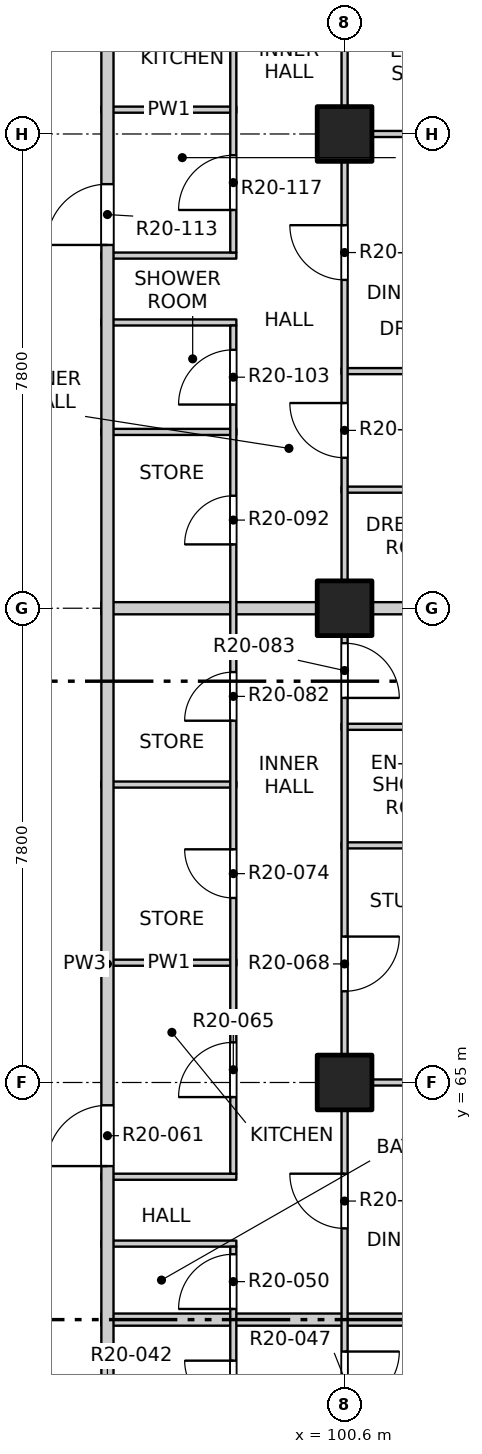
"""IFC4 building model, lengths in metres.
Left out: names, types, materials, properties, quantities, classifications, styles, units other than length and angle.
Written with IfcOpenShell. Run it as: python <this file> out.ifc"""

import sys

from ifc_helpers import new_model, si_unit, direction, frame, frame_2d, origin, origin_2d, place, context, subcontext, project, spatial, rectangle, extrude, element, fill, save


model = new_model("IFC4")
c1 = context("Model", 3, precision=1e-05, world=origin(), true_north=direction((0.0, 1.0)))
c2 = subcontext(c1, "Body", "Model", "MODEL_VIEW")
j1 = project(units=[si_unit("LENGTHUNIT", "METRE"), si_unit("PLANEANGLEUNIT", "RADIAN")], contexts=[c1])
p1 = place(None, origin())
s1 = spatial("IfcSite", under=j1, at=p1, CompositionType="ELEMENT")
p2 = place(p1, origin())
s2 = spatial("IfcBuilding", under=s1, at=p2, CompositionType="ELEMENT")
p3 = place(p2, frame((0.0, 0.0, 204.1)))
s3 = spatial("IfcBuildingStorey", under=s2, at=p3, CompositionType="ELEMENT", Elevation=204.1)
for number, where, z_axis, x_axis in (
    (1, (100.6, 65.0, -0.25), (0.0, 0.0, 1.0), (1.0, 0.0, 0.0)),
    (2, (100.6, 72.8, -0.25), (0.0, 0.0, 1.0), (1.0, 0.0, 0.0)),
    (3, (100.6, 80.6, -0.25), (0.0, 0.0, 1.0), (1.0, 0.0, 0.0)),
):
    element("IfcColumn", number, at=place(p3, frame(where, z_axis=z_axis, x_axis=x_axis)), inside=s3, PredefinedType="COLUMN", context=c2, shape_type="SweptSolid", body=[
        extrude(rectangle(XDim=0.9, YDim=0.9, at=origin_2d()), origin(), (0.0, 0.0, 1.0), 3.4),
    ])
p4 = place(p3, frame((96.6, 61.1, 0.0), z_axis=(0.0, 0.0, 1.0), x_axis=(1.0, 0.0, 0.0)))
e4 = element("IfcWall", 4, at=p4, inside=s3, PredefinedType="PARTITIONING", context=c2, shape_type="SweptSolid", body=[
    extrude(rectangle(XDim=11.5, YDim=0.2, at=frame_2d((5.75, 0.0))), origin(), (0.0, 0.0, 1.0), 2.55),
])
for number, where, z_axis, x_axis in (
    (5, (96.6, 62.35, 0.0), (0.0, 0.0, 1.0), (1.0, 0.0, 0.0)),
    (6, (96.6, 63.45, 0.0), (0.0, 0.0, 1.0), (1.0, 0.0, 0.0)),
):
    element("IfcWall", number, at=place(p3, frame(where, z_axis=z_axis, x_axis=x_axis)), inside=s3, PredefinedType="PARTITIONING", context=c2, shape_type="SweptSolid", body=[
        extrude(rectangle(XDim=2.22, YDim=0.1, at=frame_2d((1.11, 0.0))), origin(), (0.0, 0.0, 1.0), 3.15),
    ])
p5 = place(p3, frame((100.55, 65.0, 0.0), z_axis=(0.0, 0.0, 1.0), x_axis=(1.0, 0.0, 0.0)))
e7 = element("IfcWall", 7, at=p5, inside=s3, PredefinedType="PARTITIONING", context=c2, shape_type="SweptSolid", body=[
    extrude(rectangle(XDim=7.55, YDim=0.1, at=frame_2d((3.775, 0.0))), origin(), (0.0, 0.0, 1.0), 3.15),
])
p6 = place(p3, frame((96.6, 66.97, 0.0), z_axis=(0.0, 0.0, 1.0), x_axis=(1.0, 0.0, 0.0)))
e8 = element("IfcWall", 8, at=p6, inside=s3, PredefinedType="PARTITIONING", context=c2, shape_type="SweptSolid", body=[
    extrude(rectangle(XDim=2.22, YDim=0.1, at=frame_2d((1.11, 0.0))), origin(), (0.0, 0.0, 1.0), 3.15),
])
p7 = place(p3, frame((100.55, 68.9, 0.0), z_axis=(0.0, 0.0, 1.0), x_axis=(1.0, 0.0, 0.0)))
e9 = element("IfcWall", 9, at=p7, inside=s3, PredefinedType="PARTITIONING", context=c2, shape_type="SweptSolid", body=[
    extrude(rectangle(XDim=7.55, YDim=0.1, at=frame_2d((3.775, 0.0))), origin(), (0.0, 0.0, 1.0), 2.55),
])
p8 = place(p3, frame((96.6, 69.9, 0.0), z_axis=(0.0, 0.0, 1.0), x_axis=(1.0, 0.0, 0.0)))
e10 = element("IfcWall", 10, at=p8, inside=s3, PredefinedType="PARTITIONING", context=c2, shape_type="SweptSolid", body=[
    extrude(rectangle(XDim=2.22, YDim=0.1, at=frame_2d((1.11, 0.0))), origin(), (0.0, 0.0, 1.0), 3.15),
])
p9 = place(p3, frame((100.55, 70.85, 0.0), z_axis=(0.0, 0.0, 1.0), x_axis=(1.0, 0.0, 0.0)))
e11 = element("IfcWall", 11, at=p9, inside=s3, PredefinedType="PARTITIONING", context=c2, shape_type="SweptSolid", body=[
    extrude(rectangle(XDim=3.7, YDim=0.1, at=frame_2d((1.85, 0.0))), origin(), (0.0, 0.0, 1.0), 3.15),
])
p10 = place(p3, frame((96.6, 72.8, 0.0), z_axis=(0.0, 0.0, 1.0), x_axis=(1.0, 0.0, 0.0)))
e12 = element("IfcWall", 12, at=p10, inside=s3, PredefinedType="PARTITIONING", context=c2, shape_type="SweptSolid", body=[
    extrude(rectangle(XDim=11.5, YDim=0.2, at=frame_2d((5.75, 0.0))), origin(), (0.0, 0.0, 1.0), 3.15),
])
p11 = place(p3, frame((100.55, 74.75, 0.0), z_axis=(0.0, 0.0, 1.0), x_axis=(1.0, 0.0, 0.0)))
e13 = element("IfcWall", 13, at=p11, inside=s3, PredefinedType="PARTITIONING", context=c2, shape_type="SweptSolid", body=[
    extrude(rectangle(XDim=3.7, YDim=0.1, at=frame_2d((1.85, 0.0))), origin(), (0.0, 0.0, 1.0), 3.15),
])
p12 = place(p3, frame((96.6, 75.7, 0.0), z_axis=(0.0, 0.0, 1.0), x_axis=(1.0, 0.0, 0.0)))
e14 = element("IfcWall", 14, at=p12, inside=s3, PredefinedType="PARTITIONING", context=c2, shape_type="SweptSolid", body=[
    extrude(rectangle(XDim=2.22, YDim=0.1, at=frame_2d((1.11, 0.0))), origin(), (0.0, 0.0, 1.0), 3.15),
])
p13 = place(p3, frame((100.55, 76.7, 0.0), z_axis=(0.0, 0.0, 1.0), x_axis=(1.0, 0.0, 0.0)))
e15 = element("IfcWall", 15, at=p13, inside=s3, PredefinedType="PARTITIONING", context=c2, shape_type="SweptSolid", body=[
    extrude(rectangle(XDim=7.55, YDim=0.1, at=frame_2d((3.775, 0.0))), origin(), (0.0, 0.0, 1.0), 2.55),
])
for number, where, z_axis, x_axis in (
    (16, (96.6, 77.5, 0.0), (0.0, 0.0, 1.0), (1.0, 0.0, 0.0)),
    (17, (96.6, 78.6, 0.0), (0.0, 0.0, 1.0), (1.0, 0.0, 0.0)),
):
    element("IfcWall", number, at=place(p3, frame(where, z_axis=z_axis, x_axis=x_axis)), inside=s3, PredefinedType="PARTITIONING", context=c2, shape_type="SweptSolid", body=[
        extrude(rectangle(XDim=2.22, YDim=0.1, at=frame_2d((1.11, 0.0))), origin(), (0.0, 0.0, 1.0), 3.15),
    ])
p14 = place(p3, frame((100.55, 80.6, 0.0), z_axis=(0.0, 0.0, 1.0), x_axis=(1.0, 0.0, 0.0)))
e18 = element("IfcWall", 18, at=p14, inside=s3, PredefinedType="PARTITIONING", context=c2, shape_type="SweptSolid", body=[
    extrude(rectangle(XDim=7.55, YDim=0.1, at=frame_2d((3.775, 0.0))), origin(), (0.0, 0.0, 1.0), 3.15),
])
p15 = place(p3, frame((96.6, 81.0, 0.0), z_axis=(0.0, 0.0, 1.0), x_axis=(1.0, 0.0, 0.0)))
e19 = element("IfcWall", 19, at=p15, inside=s3, PredefinedType="PARTITIONING", context=c2, shape_type="SweptSolid", body=[
    extrude(rectangle(XDim=2.22, YDim=0.1, at=frame_2d((1.11, 0.0))), origin(), (0.0, 0.0, 1.0), 3.15),
])
p16 = place(p3, frame((96.7, 49.5, 0.0), z_axis=(0.0, 0.0, 1.0), x_axis=(0.0, 1.0, 0.0)))
e20 = element("IfcWall", 20, at=p16, inside=s3, PredefinedType="PARTITIONING", context=c2, shape_type="SweptSolid", body=[
    extrude(rectangle(XDim=34.9, YDim=0.2, at=frame_2d((17.45, 0.0))), origin(), (0.0, 0.0, 1.0), 3.15),
])
p17 = place(p16, frame((9.625, 0.0, 0.0)))
e21 = element("IfcOpeningElement", 21, at=p17, cuts=e20, PredefinedType="OPENING", context=c2, shape_type="SweptSolid", body=[
    extrude(rectangle(XDim=1.0, YDim=2.1, at=frame_2d((0.5, 1.05))), frame((0.0, 0.11, 0.0), z_axis=(0.0, -1.0, 0.0), x_axis=(1.0, 0.0, 0.0)), (0.0, 0.0, 1.0), 0.22),
])
p18 = place(p16, frame((14.125, 0.0, 0.0)))
e22 = element("IfcOpeningElement", 22, at=p18, cuts=e20, PredefinedType="OPENING", context=c2, shape_type="SweptSolid", body=[
    extrude(rectangle(XDim=1.0, YDim=2.1, at=frame_2d((0.5, 1.05))), frame((0.0, 0.11, 0.0), z_axis=(0.0, -1.0, 0.0), x_axis=(1.0, 0.0, 0.0)), (0.0, 0.0, 1.0), 0.22),
])
p19 = place(p16, frame((29.275, 0.0, 0.0)))
e23 = element("IfcOpeningElement", 23, at=p19, cuts=e20, PredefinedType="OPENING", context=c2, shape_type="SweptSolid", body=[
    extrude(rectangle(XDim=1.0, YDim=2.1, at=frame_2d((0.5, 1.05))), frame((0.0, 0.11, 0.0), z_axis=(0.0, -1.0, 0.0), x_axis=(1.0, 0.0, 0.0)), (0.0, 0.0, 1.0), 0.22),
])
p20 = place(p3, frame((98.77, 59.0, 0.0), z_axis=(0.0, 0.0, 1.0), x_axis=(0.0, 1.0, 0.0)))
e24 = element("IfcWall", 24, at=p20, inside=s3, PredefinedType="PARTITIONING", context=c2, shape_type="SweptSolid", body=[
    extrude(rectangle(XDim=3.3, YDim=0.1, at=frame_2d((1.65, 0.0))), origin(), (0.0, 0.0, 1.0), 3.15),
])
p21 = place(p20, frame((0.625, 0.0, 0.0)))
e25 = element("IfcOpeningElement", 25, at=p21, cuts=e24, PredefinedType="OPENING", context=c2, shape_type="SweptSolid", body=[
    extrude(rectangle(XDim=0.8, YDim=2.1, at=frame_2d((0.4, 1.05))), frame((0.0, 0.06, 0.0), z_axis=(0.0, -1.0, 0.0), x_axis=(1.0, 0.0, 0.0)), (0.0, 0.0, 1.0), 0.12),
])
p22 = place(p20, frame((2.275, 0.0, 0.0)))
e26 = element("IfcOpeningElement", 26, at=p22, cuts=e24, PredefinedType="OPENING", context=c2, shape_type="SweptSolid", body=[
    extrude(rectangle(XDim=0.9, YDim=2.1, at=frame_2d((0.45, 1.05))), frame((0.0, 0.06, 0.0), z_axis=(0.0, -1.0, 0.0), x_axis=(1.0, 0.0, 0.0)), (0.0, 0.0, 1.0), 0.12),
])
p23 = place(p3, frame((98.77, 63.5, 0.0), z_axis=(0.0, 0.0, 1.0), x_axis=(0.0, 1.0, 0.0)))
e27 = element("IfcWall", 27, at=p23, inside=s3, PredefinedType="PARTITIONING", context=c2, shape_type="SweptSolid", body=[
    extrude(rectangle(XDim=13.95, YDim=0.1, at=frame_2d((6.975, 0.0))), origin(), (0.0, 0.0, 1.0), 3.15),
])
p24 = place(p23, frame((1.26, 0.0, 0.0)))
e28 = element("IfcOpeningElement", 28, at=p24, cuts=e27, PredefinedType="OPENING", context=c2, shape_type="SweptSolid", body=[
    extrude(rectangle(XDim=0.9, YDim=2.1, at=frame_2d((0.45, 1.05))), frame((0.0, 0.06, 0.0), z_axis=(0.0, -1.0, 0.0), x_axis=(1.0, 0.0, 0.0)), (0.0, 0.0, 1.0), 0.12),
])
p25 = place(p23, frame((4.535, 0.0, 0.0)))
e29 = element("IfcOpeningElement", 29, at=p25, cuts=e27, PredefinedType="OPENING", context=c2, shape_type="SweptSolid", body=[
    extrude(rectangle(XDim=0.8, YDim=2.1, at=frame_2d((0.4, 1.05))), frame((0.0, 0.06, 0.0), z_axis=(0.0, -1.0, 0.0), x_axis=(1.0, 0.0, 0.0)), (0.0, 0.0, 1.0), 0.12),
])
p26 = place(p23, frame((7.45, 0.0, 0.0)))
e30 = element("IfcOpeningElement", 30, at=p26, cuts=e27, PredefinedType="OPENING", context=c2, shape_type="SweptSolid", body=[
    extrude(rectangle(XDim=0.8, YDim=2.1, at=frame_2d((0.4, 1.05))), frame((0.0, 0.06, 0.0), z_axis=(0.0, -1.0, 0.0), x_axis=(1.0, 0.0, 0.0)), (0.0, 0.0, 1.0), 0.12),
])
p27 = place(p23, frame((10.35, 0.0, 0.0)))
e31 = element("IfcOpeningElement", 31, at=p27, cuts=e27, PredefinedType="OPENING", context=c2, shape_type="SweptSolid", body=[
    extrude(rectangle(XDim=0.8, YDim=2.1, at=frame_2d((0.4, 1.05))), frame((0.0, 0.06, 0.0), z_axis=(0.0, -1.0, 0.0), x_axis=(1.0, 0.0, 0.0)), (0.0, 0.0, 1.0), 0.12),
])
p28 = place(p23, frame((12.65, 0.0, 0.0)))
e32 = element("IfcOpeningElement", 32, at=p28, cuts=e27, PredefinedType="OPENING", context=c2, shape_type="SweptSolid", body=[
    extrude(rectangle(XDim=0.9, YDim=2.1, at=frame_2d((0.45, 1.05))), frame((0.0, 0.06, 0.0), z_axis=(0.0, -1.0, 0.0), x_axis=(1.0, 0.0, 0.0)), (0.0, 0.0, 1.0), 0.12),
])
p29 = place(p3, frame((98.77, 78.65, 0.0), z_axis=(0.0, 0.0, 1.0), x_axis=(0.0, 1.0, 0.0)))
e33 = element("IfcWall", 33, at=p29, inside=s3, PredefinedType="PARTITIONING", context=c2, shape_type="SweptSolid", body=[
    extrude(rectangle(XDim=5.8, YDim=0.1, at=frame_2d((2.9, 0.0))), origin(), (0.0, 0.0, 1.0), 3.15),
])
p30 = place(p29, frame((0.7, 0.0, 0.0)))
e34 = element("IfcOpeningElement", 34, at=p30, cuts=e33, PredefinedType="OPENING", context=c2, shape_type="SweptSolid", body=[
    extrude(rectangle(XDim=0.9, YDim=2.1, at=frame_2d((0.45, 1.05))), frame((0.0, 0.06, 0.0), z_axis=(0.0, -1.0, 0.0), x_axis=(1.0, 0.0, 0.0)), (0.0, 0.0, 1.0), 0.12),
])
p31 = place(p29, frame((3.65, 0.0, 0.0)))
e35 = element("IfcOpeningElement", 35, at=p31, cuts=e33, PredefinedType="OPENING", context=c2, shape_type="SweptSolid", body=[
    extrude(rectangle(XDim=0.9, YDim=2.1, at=frame_2d((0.45, 1.05))), frame((0.0, 0.06, 0.0), z_axis=(0.0, -1.0, 0.0), x_axis=(1.0, 0.0, 0.0)), (0.0, 0.0, 1.0), 0.12),
])
p32 = place(p3, frame((100.6, 41.9, 0.0), z_axis=(0.0, 0.0, 1.0), x_axis=(0.0, 1.0, 0.0)))
e36 = element("IfcWall", 36, at=p32, inside=s3, PredefinedType="PARTITIONING", context=c2, shape_type="SweptSolid", body=[
    extrude(rectangle(XDim=46.2, YDim=0.1, at=frame_2d((23.1, 0.0))), origin(), (0.0, 0.0, 1.0), 3.15),
])
p33 = place(p32, frame((1.2, 0.0, 0.0)))
e37 = element("IfcOpeningElement", 37, at=p33, cuts=e36, PredefinedType="OPENING", context=c2, shape_type="SweptSolid", body=[
    extrude(rectangle(XDim=0.9, YDim=2.1, at=frame_2d((0.45, 1.05))), frame((0.0, 0.06, 0.0), z_axis=(0.0, -1.0, 0.0), x_axis=(1.0, 0.0, 0.0)), (0.0, 0.0, 1.0), 0.12),
])
p34 = place(p32, frame((6.025, 0.0, 0.0)))
e38 = element("IfcOpeningElement", 38, at=p34, cuts=e36, PredefinedType="OPENING", context=c2, shape_type="SweptSolid", body=[
    extrude(rectangle(XDim=0.9, YDim=2.1, at=frame_2d((0.45, 1.05))), frame((0.0, 0.06, 0.0), z_axis=(0.0, -1.0, 0.0), x_axis=(1.0, 0.0, 0.0)), (0.0, 0.0, 1.0), 0.12),
])
p35 = place(p32, frame((9.0, 0.0, 0.0)))
e39 = element("IfcOpeningElement", 39, at=p35, cuts=e36, PredefinedType="OPENING", context=c2, shape_type="SweptSolid", body=[
    extrude(rectangle(XDim=0.9, YDim=2.1, at=frame_2d((0.45, 1.05))), frame((0.0, 0.06, 0.0), z_axis=(0.0, -1.0, 0.0), x_axis=(1.0, 0.0, 0.0)), (0.0, 0.0, 1.0), 0.12),
])
p36 = place(p32, frame((13.85, 0.0, 0.0)))
e40 = element("IfcOpeningElement", 40, at=p36, cuts=e36, PredefinedType="OPENING", context=c2, shape_type="SweptSolid", body=[
    extrude(rectangle(XDim=0.9, YDim=2.1, at=frame_2d((0.45, 1.05))), frame((0.0, 0.06, 0.0), z_axis=(0.0, -1.0, 0.0), x_axis=(1.0, 0.0, 0.0)), (0.0, 0.0, 1.0), 0.12),
])
p37 = place(p32, frame((17.775, 0.0, 0.0)))
e41 = element("IfcOpeningElement", 41, at=p37, cuts=e36, PredefinedType="OPENING", context=c2, shape_type="SweptSolid", body=[
    extrude(rectangle(XDim=0.9, YDim=2.1, at=frame_2d((0.45, 1.05))), frame((0.0, 0.06, 0.0), z_axis=(0.0, -1.0, 0.0), x_axis=(1.0, 0.0, 0.0)), (0.0, 0.0, 1.0), 0.12),
])
p38 = place(p32, frame((20.7, 0.0, 0.0)))
e42 = element("IfcOpeningElement", 42, at=p38, cuts=e36, PredefinedType="OPENING", context=c2, shape_type="SweptSolid", body=[
    extrude(rectangle(XDim=0.9, YDim=2.1, at=frame_2d((0.45, 1.05))), frame((0.0, 0.06, 0.0), z_axis=(0.0, -1.0, 0.0), x_axis=(1.0, 0.0, 0.0)), (0.0, 0.0, 1.0), 0.12),
])
p39 = place(p32, frame((24.6, 0.0, 0.0)))
e43 = element("IfcOpeningElement", 43, at=p39, cuts=e36, PredefinedType="OPENING", context=c2, shape_type="SweptSolid", body=[
    extrude(rectangle(XDim=0.9, YDim=2.1, at=frame_2d((0.45, 1.05))), frame((0.0, 0.06, 0.0), z_axis=(0.0, -1.0, 0.0), x_axis=(1.0, 0.0, 0.0)), (0.0, 0.0, 1.0), 0.12),
])
p40 = place(p32, frame((29.425, 0.0, 0.0)))
e44 = element("IfcOpeningElement", 44, at=p40, cuts=e36, PredefinedType="OPENING", context=c2, shape_type="SweptSolid", body=[
    extrude(rectangle(XDim=0.9, YDim=2.1, at=frame_2d((0.45, 1.05))), frame((0.0, 0.06, 0.0), z_axis=(0.0, -1.0, 0.0), x_axis=(1.0, 0.0, 0.0)), (0.0, 0.0, 1.0), 0.12),
])
p41 = place(p32, frame((33.375, 0.0, 0.0)))
e45 = element("IfcOpeningElement", 45, at=p41, cuts=e36, PredefinedType="OPENING", context=c2, shape_type="SweptSolid", body=[
    extrude(rectangle(XDim=0.9, YDim=2.1, at=frame_2d((0.45, 1.05))), frame((0.0, 0.06, 0.0), z_axis=(0.0, -1.0, 0.0), x_axis=(1.0, 0.0, 0.0)), (0.0, 0.0, 1.0), 0.12),
])
p42 = place(p32, frame((36.3, 0.0, 0.0)))
e46 = element("IfcOpeningElement", 46, at=p42, cuts=e36, PredefinedType="OPENING", context=c2, shape_type="SweptSolid", body=[
    extrude(rectangle(XDim=0.9, YDim=2.1, at=frame_2d((0.45, 1.05))), frame((0.0, 0.06, 0.0), z_axis=(0.0, -1.0, 0.0), x_axis=(1.0, 0.0, 0.0)), (0.0, 0.0, 1.0), 0.12),
])
p43 = place(p32, frame((41.175, 0.0, 0.0)))
e47 = element("IfcOpeningElement", 47, at=p43, cuts=e36, PredefinedType="OPENING", context=c2, shape_type="SweptSolid", body=[
    extrude(rectangle(XDim=0.9, YDim=2.1, at=frame_2d((0.45, 1.05))), frame((0.0, 0.06, 0.0), z_axis=(0.0, -1.0, 0.0), x_axis=(1.0, 0.0, 0.0)), (0.0, 0.0, 1.0), 0.12),
])
p44 = place(p32, frame((44.1, 0.0, 0.0)))
e48 = element("IfcOpeningElement", 48, at=p44, cuts=e36, PredefinedType="OPENING", context=c2, shape_type="SweptSolid", body=[
    extrude(rectangle(XDim=0.9, YDim=2.1, at=frame_2d((0.45, 1.05))), frame((0.0, 0.06, 0.0), z_axis=(0.0, -1.0, 0.0), x_axis=(1.0, 0.0, 0.0)), (0.0, 0.0, 1.0), 0.12),
])
p45 = place(p21, origin())
e49 = element("IfcDoor", 49, at=p45, inside=s3, OperationType="SINGLE_SWING_RIGHT", PredefinedType="DOOR", context=c2, shape_type="SweptSolid", body=[
    extrude(rectangle(XDim=0.8, YDim=2.1, at=frame_2d((0.4, 1.05))), frame((0.0, 0.025, 0.0), z_axis=(0.0, -1.0, 0.0), x_axis=(1.0, 0.0, 0.0)), (0.0, 0.0, 1.0), 0.05),
])
fill(e25, e49)
p46 = place(p37, origin())
e50 = element("IfcDoor", 50, at=p46, inside=s3, OperationType="SINGLE_SWING_LEFT", PredefinedType="DOOR", context=c2, shape_type="SweptSolid", body=[
    extrude(rectangle(XDim=0.9, YDim=2.1, at=frame_2d((0.45, 1.05))), frame((0.0, 0.025, 0.0), z_axis=(0.0, -1.0, 0.0), x_axis=(1.0, 0.0, 0.0)), (0.0, 0.0, 1.0), 0.05),
])
fill(e41, e50)
p47 = place(p22, origin())
e51 = element("IfcDoor", 51, at=p47, inside=s3, OperationType="SINGLE_SWING_LEFT", PredefinedType="DOOR", context=c2, shape_type="SweptSolid", body=[
    extrude(rectangle(XDim=0.9, YDim=2.1, at=frame_2d((0.45, 1.05))), frame((0.0, 0.025, 0.0), z_axis=(0.0, -1.0, 0.0), x_axis=(1.0, 0.0, 0.0)), (0.0, 0.0, 1.0), 0.05),
])
fill(e26, e51)
p48 = place(p38, origin())
e52 = element("IfcDoor", 52, at=p48, inside=s3, OperationType="SINGLE_SWING_RIGHT", PredefinedType="DOOR", context=c2, shape_type="SweptSolid", body=[
    extrude(rectangle(XDim=0.9, YDim=2.1, at=frame_2d((0.45, 1.05))), frame((0.0, 0.025, 0.0), z_axis=(0.0, -1.0, 0.0), x_axis=(1.0, 0.0, 0.0)), (0.0, 0.0, 1.0), 0.05),
])
fill(e42, e52)
p49 = place(p18, origin())
e53 = element("IfcDoor", 53, at=p49, inside=s3, OperationType="SINGLE_SWING_LEFT", PredefinedType="DOOR", context=c2, shape_type="SweptSolid", body=[
    extrude(rectangle(XDim=1.0, YDim=2.1, at=frame_2d((0.5, 1.05))), frame((0.0, 0.025, 0.0), z_axis=(0.0, -1.0, 0.0), x_axis=(1.0, 0.0, 0.0)), (0.0, 0.0, 1.0), 0.05),
])
fill(e22, e53)
p50 = place(p24, origin())
e54 = element("IfcDoor", 54, at=p50, inside=s3, OperationType="SINGLE_SWING_LEFT", PredefinedType="DOOR", context=c2, shape_type="SweptSolid", body=[
    extrude(rectangle(XDim=0.9, YDim=2.1, at=frame_2d((0.45, 1.05))), frame((0.0, 0.025, 0.0), z_axis=(0.0, -1.0, 0.0), x_axis=(1.0, 0.0, 0.0)), (0.0, 0.0, 1.0), 0.05),
])
fill(e28, e54)
p51 = place(p39, origin())
e55 = element("IfcDoor", 55, at=p51, inside=s3, OperationType="SINGLE_SWING_LEFT", PredefinedType="DOOR", context=c2, shape_type="SweptSolid", body=[
    extrude(rectangle(XDim=0.9, YDim=2.1, at=frame_2d((0.45, 1.05))), frame((0.0, 0.025, 0.0), z_axis=(0.0, -1.0, 0.0), x_axis=(1.0, 0.0, 0.0)), (0.0, 0.0, 1.0), 0.05),
])
fill(e43, e55)
p52 = place(p25, origin())
e56 = element("IfcDoor", 56, at=p52, inside=s3, OperationType="SINGLE_SWING_RIGHT", PredefinedType="DOOR", context=c2, shape_type="SweptSolid", body=[
    extrude(rectangle(XDim=0.8, YDim=2.1, at=frame_2d((0.4, 1.05))), frame((0.0, 0.025, 0.0), z_axis=(0.0, -1.0, 0.0), x_axis=(1.0, 0.0, 0.0)), (0.0, 0.0, 1.0), 0.05),
])
fill(e29, e56)
p53 = place(p26, origin())
e57 = element("IfcDoor", 57, at=p53, inside=s3, OperationType="SINGLE_SWING_LEFT", PredefinedType="DOOR", context=c2, shape_type="SweptSolid", body=[
    extrude(rectangle(XDim=0.8, YDim=2.1, at=frame_2d((0.4, 1.05))), frame((0.0, 0.025, 0.0), z_axis=(0.0, -1.0, 0.0), x_axis=(1.0, 0.0, 0.0)), (0.0, 0.0, 1.0), 0.05),
])
fill(e30, e57)
p54 = place(p40, origin())
e58 = element("IfcDoor", 58, at=p54, inside=s3, OperationType="SINGLE_SWING_RIGHT", PredefinedType="DOOR", context=c2, shape_type="SweptSolid", body=[
    extrude(rectangle(XDim=0.9, YDim=2.1, at=frame_2d((0.45, 1.05))), frame((0.0, 0.025, 0.0), z_axis=(0.0, -1.0, 0.0), x_axis=(1.0, 0.0, 0.0)), (0.0, 0.0, 1.0), 0.05),
])
fill(e44, e58)
p55 = place(p27, origin())
e59 = element("IfcDoor", 59, at=p55, inside=s3, OperationType="SINGLE_SWING_LEFT", PredefinedType="DOOR", context=c2, shape_type="SweptSolid", body=[
    extrude(rectangle(XDim=0.8, YDim=2.1, at=frame_2d((0.4, 1.05))), frame((0.0, 0.025, 0.0), z_axis=(0.0, -1.0, 0.0), x_axis=(1.0, 0.0, 0.0)), (0.0, 0.0, 1.0), 0.05),
])
fill(e31, e59)
p56 = place(p41, origin())
e60 = element("IfcDoor", 60, at=p56, inside=s3, OperationType="SINGLE_SWING_RIGHT", PredefinedType="DOOR", context=c2, shape_type="SweptSolid", body=[
    extrude(rectangle(XDim=0.9, YDim=2.1, at=frame_2d((0.45, 1.05))), frame((0.0, 0.025, 0.0), z_axis=(0.0, -1.0, 0.0), x_axis=(1.0, 0.0, 0.0)), (0.0, 0.0, 1.0), 0.05),
])
fill(e45, e60)
p57 = place(p28, origin())
e61 = element("IfcDoor", 61, at=p57, inside=s3, OperationType="SINGLE_SWING_LEFT", PredefinedType="DOOR", context=c2, shape_type="SweptSolid", body=[
    extrude(rectangle(XDim=0.9, YDim=2.1, at=frame_2d((0.45, 1.05))), frame((0.0, 0.025, 0.0), z_axis=(0.0, -1.0, 0.0), x_axis=(1.0, 0.0, 0.0)), (0.0, 0.0, 1.0), 0.05),
])
fill(e32, e61)
p58 = place(p42, origin())
e62 = element("IfcDoor", 62, at=p58, inside=s3, OperationType="SINGLE_SWING_RIGHT", PredefinedType="DOOR", context=c2, shape_type="SweptSolid", body=[
    extrude(rectangle(XDim=0.9, YDim=2.1, at=frame_2d((0.45, 1.05))), frame((0.0, 0.025, 0.0), z_axis=(0.0, -1.0, 0.0), x_axis=(1.0, 0.0, 0.0)), (0.0, 0.0, 1.0), 0.05),
])
fill(e46, e62)
p59 = place(p19, origin())
e63 = element("IfcDoor", 63, at=p59, inside=s3, OperationType="SINGLE_SWING_LEFT", PredefinedType="DOOR", context=c2, shape_type="SweptSolid", body=[
    extrude(rectangle(XDim=1.0, YDim=2.1, at=frame_2d((0.5, 1.05))), frame((0.0, 0.025, 0.0), z_axis=(0.0, -1.0, 0.0), x_axis=(1.0, 0.0, 0.0)), (0.0, 0.0, 1.0), 0.05),
])
fill(e23, e63)
p60 = place(p30, origin())
e64 = element("IfcDoor", 64, at=p60, inside=s3, OperationType="SINGLE_SWING_LEFT", PredefinedType="DOOR", context=c2, shape_type="SweptSolid", body=[
    extrude(rectangle(XDim=0.9, YDim=2.1, at=frame_2d((0.45, 1.05))), frame((0.0, 0.025, 0.0), z_axis=(0.0, -1.0, 0.0), x_axis=(1.0, 0.0, 0.0)), (0.0, 0.0, 1.0), 0.05),
])
fill(e34, e64)
save(model, sys.argv[1])
